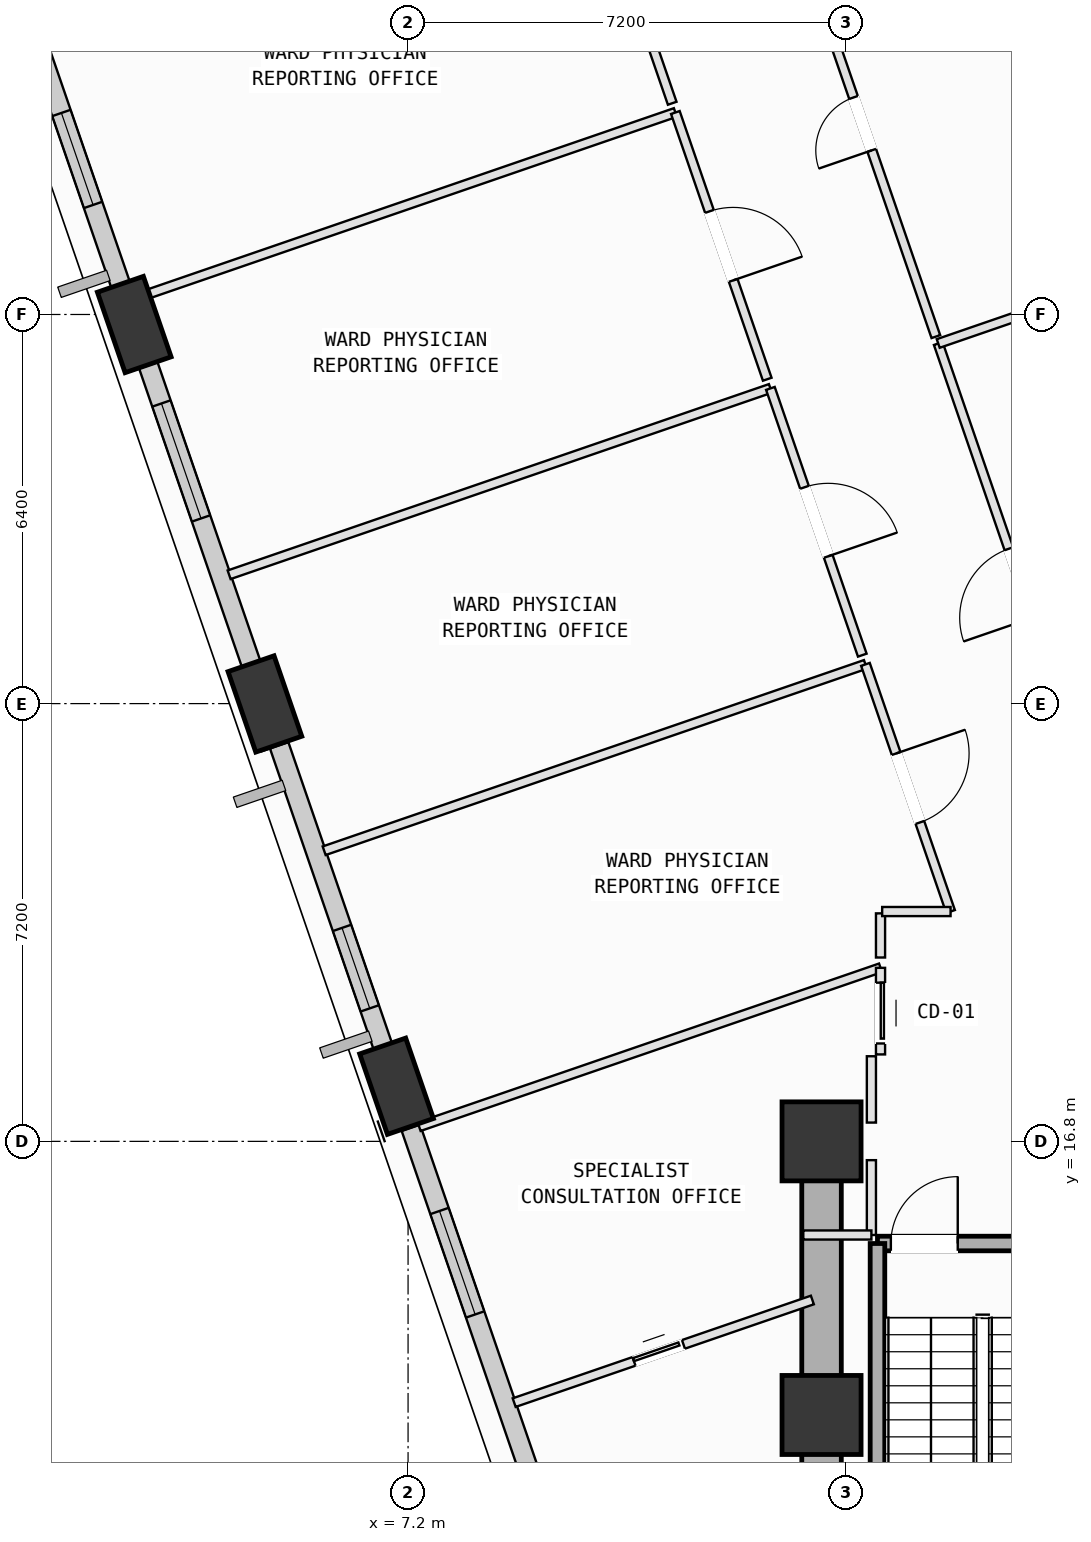
"""IFC4 building model, lengths in metres.
Left out: names, types, materials, properties, quantities, classifications, styles, units other than length and angle.
Written with IfcOpenShell. Run it as: python <this file> out.ifc"""

import sys

from ifc_helpers import new_model, si_unit, direction, frame, frame_2d, origin, origin_2d, place, context, subcontext, project, spatial, rectangle, extrude, element, fill, save


model = new_model("IFC4")
c1 = context("Model", 3, precision=1e-05, world=origin(), true_north=direction((0.0, 1.0)))
c2 = subcontext(c1, "Body", "Model", "MODEL_VIEW")
j1 = project(units=[si_unit("LENGTHUNIT", "METRE"), si_unit("PLANEANGLEUNIT", "RADIAN")], contexts=[c1])
p1 = place(None, origin())
s1 = spatial("IfcSite", under=j1, at=p1, CompositionType="ELEMENT")
p2 = place(p1, origin())
s2 = spatial("IfcBuilding", under=s1, at=p2, CompositionType="ELEMENT")
p3 = place(p2, frame((0.0, 0.0, 104.4)))
s3 = spatial("IfcBuildingStorey", under=s2, at=p3, CompositionType="ELEMENT", Elevation=104.4)
for number, where, z_axis, x_axis in (
    (1, (14.0, 12.3, 0.0), (0.0, 0.0, 1.0), (1.0, 0.0, 0.0)),
    (2, (14.0, 16.8, 0.0), (0.0, 0.0, 1.0), (1.0, 0.0, 0.0)),
):
    element("IfcColumn", number, at=place(p3, frame(where, z_axis=z_axis, x_axis=x_axis)), inside=s3, PredefinedType="COLUMN", context=c2, shape_type="SweptSolid", body=[
        extrude(rectangle(XDim=1.3, YDim=1.3, at=origin_2d()), origin(), (0.0, 0.0, 1.0), 4.0),
    ])
p4 = place(p3, frame((2.697, 30.235, 0.002), z_axis=(-0.02126385017, -0.1272196164, 0.991646619456), x_axis=(-0.166541332552, 0.978463301857, 0.121957170638)))
e3 = element("IfcColumn", 3, at=p4, inside=s3, PredefinedType="COLUMN", context=c2, shape_type="SweptSolid", body=[
    extrude(rectangle(XDim=1.4, YDim=0.8, at=origin_2d()), origin(), (0.0, 0.0, 1.0), 4.03),
])
p5 = place(p3, frame((4.846, 23.994, 0.002), z_axis=(0.004306973626, -0.11829012071, 0.992969736357), x_axis=(-0.359514473888, 0.926403444475, 0.111919619059)))
e4 = element("IfcColumn", 4, at=p5, inside=s3, PredefinedType="COLUMN", context=c2, shape_type="SweptSolid", body=[
    extrude(rectangle(XDim=1.4, YDim=0.8, at=origin_2d()), origin(), (0.0, 0.0, 1.0), 4.025),
])
p6 = place(p3, frame((7.011, 17.707, 0.002), z_axis=(0.0301059691, -0.109255533023, 0.993557677807), x_axis=(-0.563432912957, 0.819183444414, 0.107153334032)))
e5 = element("IfcColumn", 5, at=p6, inside=s3, PredefinedType="COLUMN", context=c2, shape_type="SweptSolid", body=[
    extrude(rectangle(XDim=1.4, YDim=0.8, at=origin_2d()), origin(), (0.0, 0.0, 1.0), 4.022),
])
p7 = place(p3, frame((2.615, 30.473, 0.0), z_axis=(0.0, 0.0, 1.0), x_axis=(-0.325596232986, 0.94550890692, 0.0)))
e6 = element("IfcWall", 6, at=p7, inside=s3, PredefinedType="SOLIDWALL", context=c2, shape_type="SweptSolid", body=[
    extrude(rectangle(XDim=5.456, YDim=0.32, at=frame_2d((2.728, 0.0))), origin(), (0.0, 0.0, 1.0), 3.165),
])
p8 = place(p7, frame((1.828, 0.0, 0.75)))
e7 = element("IfcOpeningElement", 7, at=p8, cuts=e6, PredefinedType="OPENING", context=c2, shape_type="SweptSolid", body=[
    extrude(rectangle(XDim=1.6, YDim=1.95, at=frame_2d((0.8, 0.975))), frame((0.0, 0.17, 0.0), z_axis=(0.0, -1.0, 0.0), x_axis=(1.0, 0.0, 0.0)), (0.0, 0.0, 1.0), 0.34),
])
p9 = place(p3, frame((4.76, 24.243, 0.0), z_axis=(0.0, 0.0, 1.0), x_axis=(-0.325569525051, 0.945518103665, 0.0)))
e8 = element("IfcWall", 8, at=p9, inside=s3, PredefinedType="SOLIDWALL", context=c2, shape_type="SweptSolid", body=[
    extrude(rectangle(XDim=5.628, YDim=0.32, at=frame_2d((2.814, 0.0))), origin(), (0.0, 0.0, 1.0), 3.165),
])
p10 = place(p9, frame((2.963, 0.0, 0.75)))
e9 = element("IfcOpeningElement", 9, at=p10, cuts=e8, PredefinedType="OPENING", context=c2, shape_type="SweptSolid", body=[
    extrude(rectangle(XDim=2.0, YDim=1.95, at=frame_2d((1.0, 0.975))), frame((0.0, 0.17, 0.0), z_axis=(0.0, -1.0, 0.0), x_axis=(1.0, 0.0, 0.0)), (0.0, 0.0, 1.0), 0.34),
])
p11 = place(p3, frame((6.923, 17.961, 0.0), z_axis=(0.0, 0.0, 1.0), x_axis=(-0.325590670388, 0.945510822443, 0.0)))
e10 = element("IfcWall", 10, at=p11, inside=s3, PredefinedType="SOLIDWALL", context=c2, shape_type="SweptSolid", body=[
    extrude(rectangle(XDim=5.662, YDim=0.32, at=frame_2d((2.831, 0.0))), origin(), (0.0, 0.0, 1.0), 3.165),
])
p12 = place(p11, frame((1.086, 0.0, 0.75)))
e11 = element("IfcOpeningElement", 11, at=p12, cuts=e10, PredefinedType="OPENING", context=c2, shape_type="SweptSolid", body=[
    extrude(rectangle(XDim=1.4, YDim=1.85, at=frame_2d((0.7, 0.925))), frame((0.0, 0.17, 0.0), z_axis=(0.0, -1.0, 0.0), x_axis=(1.0, 0.0, 0.0)), (0.0, 0.0, 1.0), 0.34),
])
p13 = place(p3, frame((9.643, 10.063, 0.0), z_axis=(0.0, 0.0, 1.0), x_axis=(-0.325566416209, 0.945519174124, 0.0)))
e12 = element("IfcWall", 12, at=p13, inside=s3, PredefinedType="SOLIDWALL", context=c2, shape_type="SweptSolid", body=[
    extrude(rectangle(XDim=7.36, YDim=0.32, at=frame_2d((3.68, 0.0))), origin(), (0.0, 0.0, 1.0), 3.165),
])
p14 = place(p13, frame((4.114, 0.0, 0.75)))
e13 = element("IfcOpeningElement", 13, at=p14, cuts=e12, PredefinedType="OPENING", context=c2, shape_type="SweptSolid", body=[
    extrude(rectangle(XDim=1.8, YDim=2.05, at=frame_2d((0.9, 1.025))), frame((0.0, 0.17, 0.0), z_axis=(0.0, -1.0, 0.0), x_axis=(1.0, 0.0, 0.0)), (0.0, 0.0, 1.0), 0.34),
])
p15 = place(p3, frame((14.92, 15.12, 0.0), z_axis=(0.0, 0.0, 1.0), x_axis=(1.0, 0.0, 0.0)))
e14 = element("IfcWall", 14, at=p15, inside=s3, PredefinedType="SOLIDWALL", context=c2, shape_type="SweptSolid", body=[
    extrude(rectangle(XDim=3.46, YDim=0.24, at=frame_2d((1.73, 0.0))), origin(), (0.0, 0.0, 1.0), 3.78),
])
p16 = place(p15, frame((0.22, 0.0, 0.0)))
e15 = element("IfcOpeningElement", 15, at=p16, cuts=e14, PredefinedType="OPENING", context=c2, shape_type="SweptSolid", body=[
    extrude(rectangle(XDim=1.1, YDim=2.15, at=frame_2d((0.55, 1.075))), frame((0.0, 0.13, 0.0), z_axis=(0.0, -1.0, 0.0), x_axis=(1.0, 0.0, 0.0)), (0.0, 0.0, 1.0), 0.26),
])
p17 = place(p3, frame((14.92, 8.125, 0.0), z_axis=(0.0, 0.0, 1.0), x_axis=(0.0, 1.0, 0.0)))
e16 = element("IfcWall", 16, at=p17, inside=s3, PredefinedType="SOLIDWALL", context=c2, shape_type="SweptSolid", body=[
    extrude(rectangle(XDim=6.995, YDim=0.24, at=frame_2d((3.498, 0.0))), origin(), (0.0, 0.0, 1.0), 3.78),
])
p18 = place(p3, frame((14.0, 16.8, 0.0), z_axis=(0.0, 0.0, 1.0), x_axis=(0.0, -1.0, 0.0)))
e17 = element("IfcWall", 17, at=p18, inside=s3, PredefinedType="SHEAR", context=c2, shape_type="SweptSolid", body=[
    extrude(rectangle(XDim=9.0, YDim=0.65, at=frame_2d((4.5, 0.0))), origin(), (0.0, 0.0, 1.0), 3.78),
])
p19 = place(p3, frame((8.945, 12.503, 0.0), z_axis=(0.0, 0.0, 1.0), x_axis=(0.945554923034, 0.325462574693, 0.0)))
e18 = element("IfcWall", 18, at=p19, inside=s3, PredefinedType="PARTITIONING", context=c2, shape_type="SweptSolid", body=[
    extrude(rectangle(XDim=5.187, YDim=0.15, at=frame_2d((2.593, 0.0))), origin(), (0.0, 0.0, 1.0), 3.78),
])
p20 = place(p19, frame((2.084, 0.0, 0.0)))
e19 = element("IfcOpeningElement", 19, at=p20, cuts=e18, PredefinedType="OPENING", context=c2, shape_type="SweptSolid", body=[
    extrude(rectangle(XDim=0.86, YDim=2.06, at=frame_2d((0.43, 1.03))), frame((0.0, 0.085, 0.0), z_axis=(0.0, -1.0, 0.0), x_axis=(1.0, 0.0, 0.0)), (0.0, 0.0, 1.0), 0.17),
])
p21 = place(p3, frame((14.82, 18.2, 0.0), z_axis=(0.0, 0.0, 1.0), x_axis=(0.0, -1.0, 0.0)))
e20 = element("IfcWall", 20, at=p21, inside=s3, PredefinedType="PARTITIONING", context=c2, shape_type="SweptSolid", body=[
    extrude(rectangle(XDim=1.091, YDim=0.15, at=frame_2d((0.545, 0.0))), origin(), (0.0, 0.0, 1.0), 3.78),
])
p22 = place(p3, frame((14.82, 16.491, 0.0), z_axis=(0.0, 0.0, 1.0), x_axis=(0.0, -1.0, 0.0)))
e21 = element("IfcWall", 21, at=p22, inside=s3, PredefinedType="PARTITIONING", context=c2, shape_type="SweptSolid", body=[
    extrude(rectangle(XDim=1.231, YDim=0.15, at=frame_2d((0.615, 0.0))), origin(), (0.0, 0.0, 1.0), 3.78),
])
p23 = place(p3, frame((14.82, 15.26, 0.0), z_axis=(0.0, 0.0, 1.0), x_axis=(-1.0, 0.0, 0.0)))
e22 = element("IfcWall", 22, at=p23, inside=s3, PredefinedType="PARTITIONING", context=c2, shape_type="SweptSolid", body=[
    extrude(rectangle(XDim=1.12, YDim=0.15, at=frame_2d((0.56, 0.0))), origin(), (0.0, 0.0, 1.0), 3.78),
])
p24 = place(p3, frame((7.382, 17.042, 0.0), z_axis=(0.0, 0.0, 1.0), x_axis=(0.945543879327, 0.325494657816, 0.0)))
e23 = element("IfcWall", 23, at=p24, inside=s3, PredefinedType="PARTITIONING", context=c2, shape_type="SweptSolid", body=[
    extrude(rectangle(XDim=8.025, YDim=0.15, at=frame_2d((4.012, 0.0))), origin(), (0.0, 0.0, 1.0), 3.78),
])
p25 = place(p3, frame((14.97, 19.654, 0.0), z_axis=(0.0, 0.0, 1.0), x_axis=(0.0, -1.0, 0.0)))
e24 = element("IfcWall", 24, at=p25, inside=s3, PredefinedType="PARTITIONING", context=c2, shape_type="SweptSolid", body=[
    extrude(rectangle(XDim=1.424, YDim=0.15, at=frame_2d((0.712, 0.0))), origin(), (0.0, 0.0, 1.0), 3.78),
])
p26 = place(p25, frame((0.244, 0.0, 0.0)))
e25 = element("IfcOpeningElement", 25, at=p26, cuts=e24, PredefinedType="OPENING", context=c2, shape_type="SweptSolid", body=[
    extrude(rectangle(XDim=1.0, YDim=2.12, at=frame_2d((0.5, 1.06))), frame((0.0, 0.085, 0.0), z_axis=(0.0, -1.0, 0.0), x_axis=(1.0, 0.0, 0.0)), (0.0, 0.0, 1.0), 0.17),
])
p27 = place(p3, frame((14.97, 20.55, 0.0), z_axis=(0.0, 0.0, 1.0), x_axis=(0.0, -1.0, 0.0)))
e26 = element("IfcWall", 26, at=p27, inside=s3, PredefinedType="PARTITIONING", context=c2, shape_type="SweptSolid", body=[
    extrude(rectangle(XDim=0.726, YDim=0.15, at=frame_2d((0.363, 0.0))), origin(), (0.0, 0.0, 1.0), 3.78),
])
p28 = place(p3, frame((6.985, 17.074, 0.0), z_axis=(0.0, 0.0, 1.0), x_axis=(-0.32500030124, 0.945713912446, 0.0)))
e27 = element("IfcWall", 27, at=p28, inside=s3, PredefinedType="PARTITIONING", context=c2, shape_type="SweptSolid", body=[
    extrude(rectangle(XDim=0.859, YDim=0.15, at=frame_2d((0.429, 0.0))), origin(), (0.0, 0.0, 1.0), 3.165),
])
p29 = place(p3, frame((5.82, 21.58, 0.0), z_axis=(0.0, 0.0, 1.0), x_axis=(0.945525547677, 0.325547905368, 0.0)))
e28 = element("IfcWall", 28, at=p29, inside=s3, PredefinedType="PARTITIONING", context=c2, shape_type="SweptSolid", body=[
    extrude(rectangle(XDim=9.415, YDim=0.15, at=frame_2d((4.708, 0.0))), origin(), (0.0, 0.0, 1.0), 3.78),
])
p30 = place(p3, frame((14.722, 24.645, 0.0), z_axis=(0.0, 0.0, 1.0), x_axis=(0.325666906351, -0.945484566827, 0.0)))
e29 = element("IfcWall", 29, at=p30, inside=s3, PredefinedType="PARTITIONING", context=c2, shape_type="SweptSolid", body=[
    extrude(rectangle(XDim=4.299, YDim=0.15, at=frame_2d((2.15, 0.0))), origin(), (0.0, 0.0, 1.0), 3.78),
])
p31 = place(p30, frame((1.55, 0.0, 0.0)))
e30 = element("IfcOpeningElement", 30, at=p31, cuts=e29, PredefinedType="OPENING", context=c2, shape_type="SweptSolid", body=[
    extrude(rectangle(XDim=1.2, YDim=2.15, at=frame_2d((0.6, 1.075))), frame((0.0, 0.085, 0.0), z_axis=(0.0, -1.0, 0.0), x_axis=(1.0, 0.0, 0.0)), (0.0, 0.0, 1.0), 0.17),
])
p32 = place(p3, frame((16.122, 20.58, 0.0), z_axis=(0.0, 0.0, 1.0), x_axis=(-1.0, 0.0, 0.0)))
e31 = element("IfcWall", 31, at=p32, inside=s3, PredefinedType="PARTITIONING", context=c2, shape_type="SweptSolid", body=[
    extrude(rectangle(XDim=1.125, YDim=0.15, at=frame_2d((0.562, 0.0))), origin(), (0.0, 0.0, 1.0), 3.78),
])
p33 = place(p3, frame((4.257, 26.119, 0.0), z_axis=(0.0, 0.0, 1.0), x_axis=(0.945517565291, 0.325571088592, 0.0)))
e32 = element("IfcWall", 32, at=p33, inside=s3, PredefinedType="PARTITIONING", context=c2, shape_type="SweptSolid", body=[
    extrude(rectangle(XDim=9.415, YDim=0.15, at=frame_2d((4.708, 0.0))), origin(), (0.0, 0.0, 1.0), 3.78),
])
p34 = place(p3, frame((13.159, 29.184, 0.0), z_axis=(0.0, 0.0, 1.0), x_axis=(0.325651749866, -0.945489787258, 0.0)))
e33 = element("IfcWall", 33, at=p34, inside=s3, PredefinedType="PARTITIONING", context=c2, shape_type="SweptSolid", body=[
    extrude(rectangle(XDim=4.64, YDim=0.15, at=frame_2d((2.32, 0.0))), origin(), (0.0, 0.0, 1.0), 3.78),
])
p35 = place(p34, frame((1.72, 0.0, 0.0)))
e34 = element("IfcOpeningElement", 34, at=p35, cuts=e33, PredefinedType="OPENING", context=c2, shape_type="SweptSolid", body=[
    extrude(rectangle(XDim=1.2, YDim=2.15, at=frame_2d((0.6, 1.075))), frame((0.0, 0.085, 0.0), z_axis=(0.0, -1.0, 0.0), x_axis=(1.0, 0.0, 0.0)), (0.0, 0.0, 1.0), 0.17),
])
p36 = place(p3, frame((4.863, 23.24, 0.0), z_axis=(0.0, 0.0, 1.0), x_axis=(-0.325753286452, 0.945454809267, 0.0)))
e35 = element("IfcWall", 35, at=p36, inside=s3, PredefinedType="PARTITIONING", context=c2, shape_type="SweptSolid", body=[
    extrude(rectangle(XDim=0.983, YDim=0.15, at=frame_2d((0.491, 0.0))), origin(), (0.0, 0.0, 1.0), 3.165),
])
p37 = place(p3, frame((2.694, 30.657, 0.0), z_axis=(0.0, 0.0, 1.0), x_axis=(0.945525547677, 0.325547905368, 0.0)))
e36 = element("IfcWall", 36, at=p37, inside=s3, PredefinedType="PARTITIONING", context=c2, shape_type="SweptSolid", body=[
    extrude(rectangle(XDim=9.415, YDim=0.15, at=frame_2d((4.708, 0.0))), origin(), (0.0, 0.0, 1.0), 3.78),
])
p38 = place(p3, frame((11.596, 33.722, 0.0), z_axis=(0.0, 0.0, 1.0), x_axis=(0.325651749866, -0.945489787258, 0.0)))
e37 = element("IfcWall", 37, at=p38, inside=s3, PredefinedType="PARTITIONING", context=c2, shape_type="SweptSolid", body=[
    extrude(rectangle(XDim=4.64, YDim=0.15, at=frame_2d((2.32, 0.0))), origin(), (0.0, 0.0, 1.0), 2.965),
])
p39 = place(p38, frame((1.72, 0.0, 0.0)))
e38 = element("IfcOpeningElement", 38, at=p39, cuts=e37, PredefinedType="OPENING", context=c2, shape_type="SweptSolid", body=[
    extrude(rectangle(XDim=1.2, YDim=2.15, at=frame_2d((0.6, 1.075))), frame((0.0, 0.085, 0.0), z_axis=(0.0, -1.0, 0.0), x_axis=(1.0, 0.0, 0.0)), (0.0, 0.0, 1.0), 0.17),
])
p40 = place(p3, frame((2.71, 29.49, 0.0), z_axis=(0.0, 0.0, 1.0), x_axis=(-0.325896670091, 0.94540539475, 0.0)))
e39 = element("IfcWall", 39, at=p40, inside=s3, PredefinedType="PARTITIONING", context=c2, shape_type="SweptSolid", body=[
    extrude(rectangle(XDim=0.96, YDim=0.15, at=frame_2d((0.48, 0.0))), origin(), (0.0, 0.0, 1.0), 3.165),
])
p41 = place(p3, frame((10.034, 38.261, 0.0), z_axis=(0.0, 0.0, 1.0), x_axis=(0.32546357949, -0.94555457718, 0.0)))
e40 = element("IfcWall", 40, at=p41, inside=s3, PredefinedType="PARTITIONING", context=c2, shape_type="SweptSolid", body=[
    extrude(rectangle(XDim=4.64, YDim=0.15, at=frame_2d((2.32, 0.0))), origin(), (0.0, 0.0, 1.0), 2.965),
])
p42 = place(p41, frame((1.72, 0.0, 0.0)))
e41 = element("IfcOpeningElement", 41, at=p42, cuts=e40, PredefinedType="OPENING", context=c2, shape_type="SweptSolid", body=[
    extrude(rectangle(XDim=1.2, YDim=2.15, at=frame_2d((0.6, 1.075))), frame((0.0, 0.085, 0.0), z_axis=(0.0, -1.0, 0.0), x_axis=(1.0, 0.0, 0.0)), (0.0, 0.0, 1.0), 0.17),
])
p43 = place(p3, frame((18.634, 22.037, 0.0), z_axis=(0.0, 0.0, 1.0), x_axis=(-0.325538681008, 0.945528723608, 0.0)))
e42 = element("IfcWall", 42, at=p43, inside=s3, PredefinedType="PARTITIONING", context=c2, shape_type="SweptSolid", body=[
    extrude(rectangle(XDim=8.34, YDim=0.15, at=frame_2d((4.17, 0.0))), origin(), (0.0, 0.0, 1.0), 3.78),
])
p44 = place(p43, frame((3.57, 0.0, 0.0)))
e43 = element("IfcOpeningElement", 43, at=p44, cuts=e42, PredefinedType="OPENING", context=c2, shape_type="SweptSolid", body=[
    extrude(rectangle(XDim=1.2, YDim=2.15, at=frame_2d((0.6, 1.075))), frame((0.0, 0.085, 0.0), z_axis=(0.0, -1.0, 0.0), x_axis=(1.0, 0.0, 0.0)), (0.0, 0.0, 1.0), 0.17),
])
p45 = place(p3, frame((15.919, 29.923, 0.0), z_axis=(0.0, 0.0, 1.0), x_axis=(0.945531989451, 0.325529195195, 0.0)))
e44 = element("IfcWall", 44, at=p45, inside=s3, PredefinedType="PARTITIONING", context=c2, shape_type="SweptSolid", body=[
    extrude(rectangle(XDim=8.365, YDim=0.15, at=frame_2d((4.182, 0.0))), origin(), (0.0, 0.0, 1.0), 3.78),
])
p46 = place(p3, frame((15.88, 30.036, 0.0), z_axis=(0.0, 0.0, 1.0), x_axis=(-0.325525994822, 0.945533091274, 0.0)))
e45 = element("IfcWall", 45, at=p46, inside=s3, PredefinedType="PARTITIONING", context=c2, shape_type="SweptSolid", body=[
    extrude(rectangle(XDim=7.4, YDim=0.15, at=frame_2d((3.7, 0.0))), origin(), (0.0, 0.0, 1.0), 3.78),
])
p47 = place(p46, frame((3.24, 0.0, 0.0)))
e46 = element("IfcOpeningElement", 46, at=p47, cuts=e45, PredefinedType="OPENING", context=c2, shape_type="SweptSolid", body=[
    extrude(rectangle(XDim=0.92, YDim=2.1, at=frame_2d((0.46, 1.05))), frame((0.0, 0.085, 0.0), z_axis=(0.0, -1.0, 0.0), x_axis=(1.0, 0.0, 0.0)), (0.0, 0.0, 1.0), 0.17),
])
p48 = place(p8, origin())
e47 = element("IfcWindow", 47, at=p48, inside=s3, PartitioningType="SINGLE_PANEL", PredefinedType="WINDOW", context=c2, shape_type="SweptSolid", body=[
    extrude(rectangle(XDim=1.6, YDim=1.95, at=frame_2d((0.8, 0.975))), frame((0.0, 0.03, 0.0), z_axis=(0.0, -1.0, 0.0), x_axis=(1.0, 0.0, 0.0)), (0.0, 0.0, 1.0), 0.06),
])
fill(e7, e47)
p49 = place(p10, origin())
e48 = element("IfcWindow", 48, at=p49, inside=s3, PartitioningType="SINGLE_PANEL", PredefinedType="WINDOW", context=c2, shape_type="SweptSolid", body=[
    extrude(rectangle(XDim=2.0, YDim=1.95, at=frame_2d((1.0, 0.975))), frame((0.0, 0.03, 0.0), z_axis=(0.0, -1.0, 0.0), x_axis=(1.0, 0.0, 0.0)), (0.0, 0.0, 1.0), 0.06),
])
fill(e9, e48)
p50 = place(p12, origin())
e49 = element("IfcWindow", 49, at=p50, inside=s3, PartitioningType="SINGLE_PANEL", PredefinedType="WINDOW", context=c2, shape_type="SweptSolid", body=[
    extrude(rectangle(XDim=1.4, YDim=1.85, at=frame_2d((0.7, 0.925))), frame((0.0, 0.03, 0.0), z_axis=(0.0, -1.0, 0.0), x_axis=(1.0, 0.0, 0.0)), (0.0, 0.0, 1.0), 0.06),
])
fill(e11, e49)
p51 = place(p14, origin())
e50 = element("IfcWindow", 50, at=p51, inside=s3, PartitioningType="SINGLE_PANEL", PredefinedType="WINDOW", context=c2, shape_type="SweptSolid", body=[
    extrude(rectangle(XDim=1.8, YDim=2.05, at=frame_2d((0.9, 1.025))), frame((0.0, 0.03, 0.0), z_axis=(0.0, -1.0, 0.0), x_axis=(1.0, 0.0, 0.0)), (0.0, 0.0, 1.0), 0.06),
])
fill(e13, e50)
p52 = place(p16, origin())
e51 = element("IfcDoor", 51, at=p52, inside=s3, OperationType="SINGLE_SWING_RIGHT", PredefinedType="DOOR", context=c2, shape_type="SweptSolid", body=[
    extrude(rectangle(XDim=1.1, YDim=2.15, at=frame_2d((0.55, 1.075))), frame((0.0, 0.025, 0.0), z_axis=(0.0, -1.0, 0.0), x_axis=(1.0, 0.0, 0.0)), (0.0, 0.0, 1.0), 0.05),
])
fill(e15, e51)
p53 = place(p26, origin())
e52 = element("IfcDoor", 52, at=p53, inside=s3, OperationType="SLIDING_TO_LEFT", PredefinedType="DOOR", context=c2, shape_type="SweptSolid", body=[
    extrude(rectangle(XDim=1.0, YDim=2.12, at=frame_2d((0.5, 1.06))), frame((0.0, 0.025, 0.0), z_axis=(0.0, -1.0, 0.0), x_axis=(1.0, 0.0, 0.0)), (0.0, 0.0, 1.0), 0.05),
])
fill(e25, e52)
p54 = place(p31, origin())
e53 = element("IfcDoor", 53, at=p54, inside=s3, OperationType="SINGLE_SWING_LEFT", PredefinedType="DOOR", context=c2, shape_type="SweptSolid", body=[
    extrude(rectangle(XDim=1.2, YDim=2.15, at=frame_2d((0.6, 1.075))), frame((0.0, 0.025, 0.0), z_axis=(0.0, -1.0, 0.0), x_axis=(1.0, 0.0, 0.0)), (0.0, 0.0, 1.0), 0.05),
])
fill(e30, e53)
p55 = place(p35, origin())
e54 = element("IfcDoor", 54, at=p55, inside=s3, OperationType="SINGLE_SWING_RIGHT", PredefinedType="DOOR", context=c2, shape_type="SweptSolid", body=[
    extrude(rectangle(XDim=1.2, YDim=2.15, at=frame_2d((0.6, 1.075))), frame((0.0, 0.025, 0.0), z_axis=(0.0, -1.0, 0.0), x_axis=(1.0, 0.0, 0.0)), (0.0, 0.0, 1.0), 0.05),
])
fill(e34, e54)
p56 = place(p39, origin())
e55 = element("IfcDoor", 55, at=p56, inside=s3, OperationType="SINGLE_SWING_RIGHT", PredefinedType="DOOR", context=c2, shape_type="SweptSolid", body=[
    extrude(rectangle(XDim=1.2, YDim=2.15, at=frame_2d((0.6, 1.075))), frame((0.0, 0.025, 0.0), z_axis=(0.0, -1.0, 0.0), x_axis=(1.0, 0.0, 0.0)), (0.0, 0.0, 1.0), 0.05),
])
fill(e38, e55)
p57 = place(p44, origin())
e56 = element("IfcDoor", 56, at=p57, inside=s3, OperationType="SINGLE_SWING_LEFT", PredefinedType="DOOR", context=c2, shape_type="SweptSolid", body=[
    extrude(rectangle(XDim=1.2, YDim=2.15, at=frame_2d((0.6, 1.075))), frame((0.0, 0.025, 0.0), z_axis=(0.0, -1.0, 0.0), x_axis=(1.0, 0.0, 0.0)), (0.0, 0.0, 1.0), 0.05),
])
fill(e43, e56)
p58 = place(p47, origin())
e57 = element("IfcDoor", 57, at=p58, inside=s3, OperationType="SINGLE_SWING_LEFT", PredefinedType="DOOR", context=c2, shape_type="SweptSolid", body=[
    extrude(rectangle(XDim=0.92, YDim=2.1, at=frame_2d((0.46, 1.05))), frame((0.0, 0.025, 0.0), z_axis=(0.0, -1.0, 0.0), x_axis=(1.0, 0.0, 0.0)), (0.0, 0.0, 1.0), 0.05),
])
fill(e46, e57)
p59 = place(p20, origin())
e58 = element("IfcDoor", 58, at=p59, inside=s3, OperationType="SLIDING_TO_LEFT", PredefinedType="DOOR", context=c2, shape_type="SweptSolid", body=[
    extrude(rectangle(XDim=0.86, YDim=2.06, at=frame_2d((0.43, 1.03))), frame((0.0, 0.025, 0.0), z_axis=(0.0, -1.0, 0.0), x_axis=(1.0, 0.0, 0.0)), (0.0, 0.0, 1.0), 0.05),
])
fill(e19, e58)
save(model, sys.argv[1])
